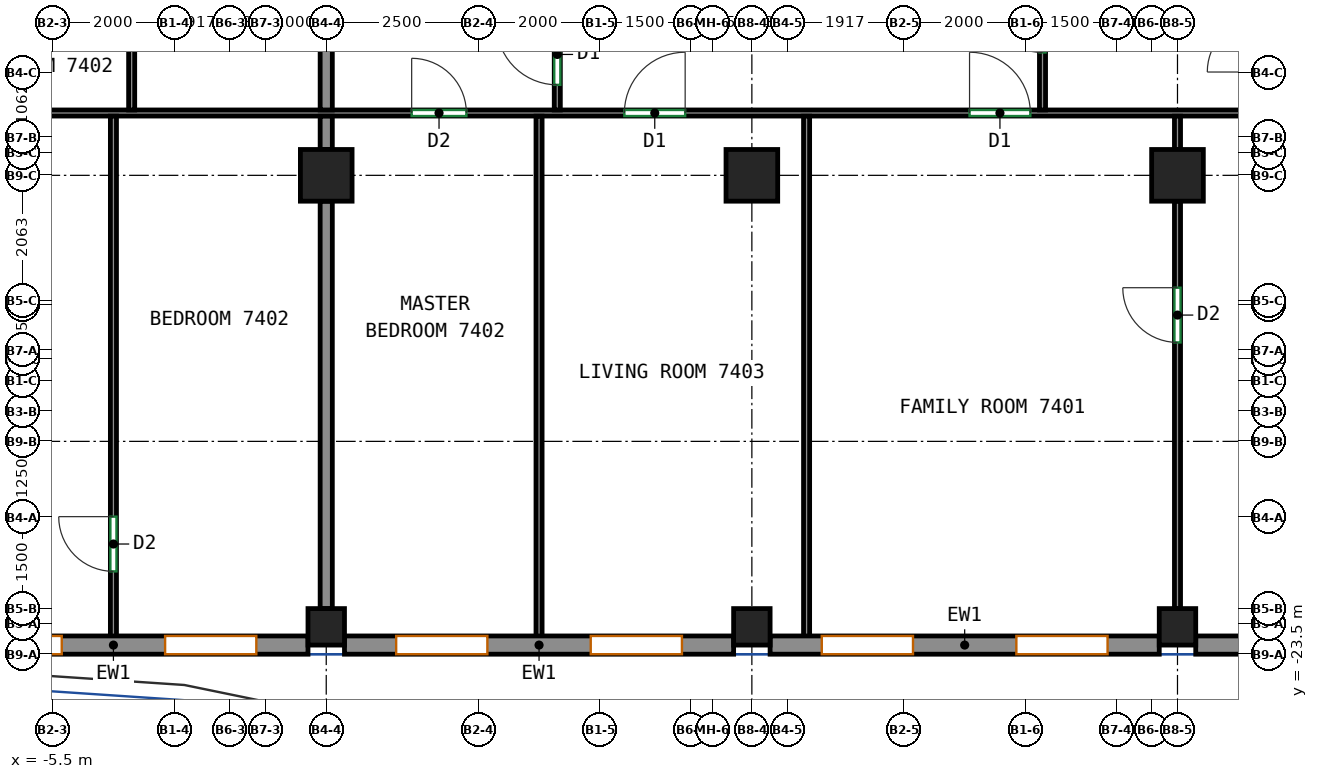
"""IFC4 building model, lengths in metres.
Left out: names, types, materials, properties, quantities, classifications, styles, units other than length and angle.
Written with IfcOpenShell. Run it as: python <this file> out.ifc"""

import sys

from ifc_helpers import new_model, si_unit, direction, frame, frame_2d, origin, origin_2d, place, context, subcontext, project, spatial, rectangle, extrude, source, transform, mapped, element, fill, save


model = new_model("IFC4")
c1 = context("Model", 3, precision=1e-05, world=origin(), true_north=direction((0.0, 1.0)))
c2 = subcontext(c1, "Body", "Model", "MODEL_VIEW")
j1 = project(units=[si_unit("LENGTHUNIT", "METRE"), si_unit("PLANEANGLEUNIT", "RADIAN")], contexts=[c1])
p1 = place(None, origin())
s1 = spatial("IfcSite", under=j1, at=p1, CompositionType="ELEMENT")
p2 = place(p1, origin())
s2 = spatial("IfcBuilding", under=s1, at=p2, CompositionType="ELEMENT")
p3 = place(p2, frame((0.0, 0.0, 298.4)))
s3 = spatial("IfcBuildingStorey", under=s2, at=p3, CompositionType="ELEMENT", Elevation=298.4)
m1 = source(origin(), c2, "Body", "SweptSolid", [
    extrude(rectangle(XDim=0.6, YDim=0.6, at=origin_2d()), origin(), (0.0, 0.0, 1.0), 3.12),
])
p4 = place(p3, frame((-1.0, -23.05, 0.0), z_axis=(0.0, 0.0, 1.0), x_axis=(1.0, 0.0, 0.0)))
e1 = element("IfcColumn", 1, at=p4, inside=s3, PredefinedType="COLUMN", context=c2, shape_type="MappedRepresentation", body=[
    mapped(m1, transform((0.0, 0.0, 0.0))),
])
m2 = source(origin(), c2, "Body", "SweptSolid", [
    extrude(rectangle(XDim=0.85, YDim=0.85, at=origin_2d()), origin(), (0.0, 0.0, 1.0), 3.12),
])
p5 = place(p3, frame((-1.0, -15.625, 0.0), z_axis=(0.0, 0.0, 1.0), x_axis=(1.0, 0.0, 0.0)))
e2 = element("IfcColumn", 2, at=p5, inside=s3, PredefinedType="COLUMN", context=c2, shape_type="MappedRepresentation", body=[
    mapped(m2, transform((0.0, 0.0, 0.0))),
])
p6 = place(p3, frame((6.0, -23.05, 0.0), z_axis=(0.0, 0.0, 1.0), x_axis=(1.0, 0.0, 0.0)))
e3 = element("IfcColumn", 3, at=p6, inside=s3, PredefinedType="COLUMN", context=c2, shape_type="MappedRepresentation", body=[
    mapped(m1, transform((0.0, 0.0, 0.0))),
])
p7 = place(p3, frame((6.0, -15.625, 0.0), z_axis=(0.0, 0.0, 1.0), x_axis=(1.0, 0.0, 0.0)))
e4 = element("IfcColumn", 4, at=p7, inside=s3, PredefinedType="COLUMN", context=c2, shape_type="MappedRepresentation", body=[
    mapped(m2, transform((0.0, 0.0, 0.0))),
])
p8 = place(p3, frame((13.0, -23.05, 0.0), z_axis=(0.0, 0.0, 1.0), x_axis=(1.0, 0.0, 0.0)))
e5 = element("IfcColumn", 5, at=p8, inside=s3, PredefinedType="COLUMN", context=c2, shape_type="MappedRepresentation", body=[
    mapped(m1, transform((0.0, 0.0, 0.0))),
])
p9 = place(p3, frame((13.0, -15.625, 0.0), z_axis=(0.0, 0.0, 1.0), x_axis=(1.0, 0.0, 0.0)))
e6 = element("IfcColumn", 6, at=p9, inside=s3, PredefinedType="COLUMN", context=c2, shape_type="MappedRepresentation", body=[
    mapped(m2, transform((0.0, 0.0, 0.0))),
])
m3 = source(origin(), c2, "Body", "SweptSolid", [
    extrude(rectangle(XDim=6.4, YDim=0.3, at=frame_2d((3.2, 0.0))), origin(), (0.0, 0.0, 1.0), 3.12),
])
p10 = place(p3, frame((-7.7, -23.35, 0.0), z_axis=(0.0, 0.0, 1.0), x_axis=(1.0, 0.0, 0.0)))
e7 = element("IfcWall", 7, at=p10, inside=s3, PredefinedType="SOLIDWALL", context=c2, shape_type="MappedRepresentation", body=[
    mapped(m3, transform((0.0, 0.0, 0.0))),
])
p11 = place(p10, frame((0.85, 0.0, 0.8)))
e8 = element("IfcOpeningElement", 8, at=p11, cuts=e7, PredefinedType="OPENING", context=c2, shape_type="SweptSolid", body=[
    extrude(rectangle(XDim=1.5, YDim=2.05, at=frame_2d((0.75, 1.025))), frame((0.0, 0.16, 0.0), z_axis=(0.0, -1.0, 0.0), x_axis=(1.0, 0.0, 0.0)), (0.0, 0.0, 1.0), 0.32),
])
p12 = place(p10, frame((4.05, 0.0, 0.8)))
e9 = element("IfcOpeningElement", 9, at=p12, cuts=e7, PredefinedType="OPENING", context=c2, shape_type="SweptSolid", body=[
    extrude(rectangle(XDim=1.5, YDim=2.05, at=frame_2d((0.75, 1.025))), frame((0.0, 0.16, 0.0), z_axis=(0.0, -1.0, 0.0), x_axis=(1.0, 0.0, 0.0)), (0.0, 0.0, 1.0), 0.32),
])
p13 = place(p3, frame((-0.7, -23.35, 0.0), z_axis=(0.0, 0.0, 1.0), x_axis=(1.0, 0.0, 0.0)))
e10 = element("IfcWall", 10, at=p13, inside=s3, PredefinedType="SOLIDWALL", context=c2, shape_type="MappedRepresentation", body=[
    mapped(m3, transform((0.0, 0.0, 0.0))),
])
p14 = place(p13, frame((0.85, 0.0, 0.8)))
e11 = element("IfcOpeningElement", 11, at=p14, cuts=e10, PredefinedType="OPENING", context=c2, shape_type="SweptSolid", body=[
    extrude(rectangle(XDim=1.5, YDim=2.05, at=frame_2d((0.75, 1.025))), frame((0.0, 0.16, 0.0), z_axis=(0.0, -1.0, 0.0), x_axis=(1.0, 0.0, 0.0)), (0.0, 0.0, 1.0), 0.32),
])
p15 = place(p13, frame((4.05, 0.0, 0.8)))
e12 = element("IfcOpeningElement", 12, at=p15, cuts=e10, PredefinedType="OPENING", context=c2, shape_type="SweptSolid", body=[
    extrude(rectangle(XDim=1.5, YDim=2.05, at=frame_2d((0.75, 1.025))), frame((0.0, 0.16, 0.0), z_axis=(0.0, -1.0, 0.0), x_axis=(1.0, 0.0, 0.0)), (0.0, 0.0, 1.0), 0.32),
])
p16 = place(p3, frame((6.3, -23.35, 0.0), z_axis=(0.0, 0.0, 1.0), x_axis=(1.0, 0.0, 0.0)))
e13 = element("IfcWall", 13, at=p16, inside=s3, PredefinedType="SOLIDWALL", context=c2, shape_type="MappedRepresentation", body=[
    mapped(m3, transform((0.0, 0.0, 0.0))),
])
p17 = place(p16, frame((0.85, 0.0, 0.8)))
e14 = element("IfcOpeningElement", 14, at=p17, cuts=e13, PredefinedType="OPENING", context=c2, shape_type="SweptSolid", body=[
    extrude(rectangle(XDim=1.5, YDim=2.05, at=frame_2d((0.75, 1.025))), frame((0.0, 0.16, 0.0), z_axis=(0.0, -1.0, 0.0), x_axis=(1.0, 0.0, 0.0)), (0.0, 0.0, 1.0), 0.32),
])
p18 = place(p16, frame((4.05, 0.0, 0.8)))
e15 = element("IfcOpeningElement", 15, at=p18, cuts=e13, PredefinedType="OPENING", context=c2, shape_type="SweptSolid", body=[
    extrude(rectangle(XDim=1.5, YDim=2.05, at=frame_2d((0.75, 1.025))), frame((0.0, 0.16, 0.0), z_axis=(0.0, -1.0, 0.0), x_axis=(1.0, 0.0, 0.0)), (0.0, 0.0, 1.0), 0.32),
])
p19 = place(p3, frame((13.3, -23.35, 0.0), z_axis=(0.0, 0.0, 1.0), x_axis=(1.0, 0.0, 0.0)))
e16 = element("IfcWall", 16, at=p19, inside=s3, PredefinedType="SOLIDWALL", context=c2, shape_type="MappedRepresentation", body=[
    mapped(m3, transform((0.0, 0.0, 0.0))),
])
p20 = place(p19, frame((0.85, 0.0, 0.8)))
e17 = element("IfcOpeningElement", 17, at=p20, cuts=e16, PredefinedType="OPENING", context=c2, shape_type="SweptSolid", body=[
    extrude(rectangle(XDim=1.5, YDim=2.05, at=frame_2d((0.75, 1.025))), frame((0.0, 0.16, 0.0), z_axis=(0.0, -1.0, 0.0), x_axis=(1.0, 0.0, 0.0)), (0.0, 0.0, 1.0), 0.32),
])
p21 = place(p19, frame((4.05, 0.0, 0.8)))
e18 = element("IfcOpeningElement", 18, at=p21, cuts=e16, PredefinedType="OPENING", context=c2, shape_type="SweptSolid", body=[
    extrude(rectangle(XDim=1.5, YDim=2.05, at=frame_2d((0.75, 1.025))), frame((0.0, 0.16, 0.0), z_axis=(0.0, -1.0, 0.0), x_axis=(1.0, 0.0, 0.0)), (0.0, 0.0, 1.0), 0.32),
])
p22 = place(p3, frame((-13.55, -14.6, 0.0), z_axis=(0.0, 0.0, 1.0), x_axis=(1.0, 0.0, 0.0)))
e19 = element("IfcWall", 19, at=p22, inside=s3, PredefinedType="PARTITIONING", context=c2, shape_type="SweptSolid", body=[
    extrude(rectangle(XDim=31.3, YDim=0.1, at=frame_2d((15.65, 0.0))), origin(), (0.0, 0.0, 1.0), 3.12),
])
p23 = place(p22, frame((0.309, 0.0, 0.0)))
e20 = element("IfcOpeningElement", 20, at=p23, cuts=e19, PredefinedType="OPENING", context=c2, shape_type="SweptSolid", body=[
    extrude(rectangle(XDim=0.9, YDim=2.1, at=frame_2d((0.45, 1.05))), frame((0.0, 0.06, 0.0), z_axis=(0.0, -1.0, 0.0), x_axis=(1.0, 0.0, 0.0)), (0.0, 0.0, 1.0), 0.12),
])
p24 = place(p22, frame((4.103, 0.0, 0.0)))
e21 = element("IfcOpeningElement", 21, at=p24, cuts=e19, PredefinedType="OPENING", context=c2, shape_type="SweptSolid", body=[
    extrude(rectangle(XDim=1.0, YDim=2.1, at=frame_2d((0.5, 1.05))), frame((0.0, 0.06, 0.0), z_axis=(0.0, -1.0, 0.0), x_axis=(1.0, 0.0, 0.0)), (0.0, 0.0, 1.0), 0.12),
])
p25 = place(p22, frame((13.955, 0.0, 0.0)))
e22 = element("IfcOpeningElement", 22, at=p25, cuts=e19, PredefinedType="OPENING", context=c2, shape_type="SweptSolid", body=[
    extrude(rectangle(XDim=0.9, YDim=2.1, at=frame_2d((0.45, 1.05))), frame((0.0, 0.06, 0.0), z_axis=(0.0, -1.0, 0.0), x_axis=(1.0, 0.0, 0.0)), (0.0, 0.0, 1.0), 0.12),
])
p26 = place(p22, frame((17.453, 0.0, 0.0)))
e23 = element("IfcOpeningElement", 23, at=p26, cuts=e19, PredefinedType="OPENING", context=c2, shape_type="SweptSolid", body=[
    extrude(rectangle(XDim=1.0, YDim=2.1, at=frame_2d((0.5, 1.05))), frame((0.0, 0.06, 0.0), z_axis=(0.0, -1.0, 0.0), x_axis=(1.0, 0.0, 0.0)), (0.0, 0.0, 1.0), 0.12),
])
p27 = place(p22, frame((23.13, 0.0, 0.0)))
e24 = element("IfcOpeningElement", 24, at=p27, cuts=e19, PredefinedType="OPENING", context=c2, shape_type="SweptSolid", body=[
    extrude(rectangle(XDim=1.0, YDim=2.1, at=frame_2d((0.5, 1.05))), frame((0.0, 0.06, 0.0), z_axis=(0.0, -1.0, 0.0), x_axis=(1.0, 0.0, 0.0)), (0.0, 0.0, 1.0), 0.12),
])
p28 = place(p3, frame((-4.2, -14.55, 0.0), z_axis=(0.0, 0.0, 1.0), x_axis=(0.0, 1.0, 0.0)))
e25 = element("IfcWall", 25, at=p28, inside=s3, PredefinedType="PARTITIONING", context=c2, shape_type="SweptSolid", body=[
    extrude(rectangle(XDim=2.573, YDim=0.1, at=frame_2d((1.287, 0.0))), origin(), (0.0, 0.0, 1.0), 3.12),
])
p29 = place(p28, frame((1.261, 0.0, 0.0)))
e26 = element("IfcOpeningElement", 26, at=p29, cuts=e25, PredefinedType="OPENING", context=c2, shape_type="SweptSolid", body=[
    extrude(rectangle(XDim=0.9, YDim=2.1, at=frame_2d((0.45, 1.05))), frame((0.0, 0.06, 0.0), z_axis=(0.0, -1.0, 0.0), x_axis=(1.0, 0.0, 0.0)), (0.0, 0.0, 1.0), 0.12),
])
p30 = place(p3, frame((-1.0, -14.55, 0.0), z_axis=(0.0, 0.0, 1.0), x_axis=(0.0, 1.0, 0.0)))
e27 = element("IfcWall", 27, at=p30, inside=s3, PredefinedType="PARTITIONING", context=c2, shape_type="SweptSolid", body=[
    extrude(rectangle(XDim=2.573, YDim=0.2, at=frame_2d((1.287, 0.0))), origin(), (0.0, 0.0, 1.0), 3.12),
])
p31 = place(p3, frame((-4.5, -23.25, 0.0), z_axis=(0.0, 0.0, 1.0), x_axis=(0.0, 1.0, 0.0)))
e28 = element("IfcWall", 28, at=p31, inside=s3, PredefinedType="PARTITIONING", context=c2, shape_type="SweptSolid", body=[
    extrude(rectangle(XDim=8.598, YDim=0.1, at=frame_2d((4.299, 0.0))), origin(), (0.0, 0.0, 1.0), 3.12),
])
p32 = place(p31, frame((1.112, 0.0, 0.0)))
e29 = element("IfcOpeningElement", 29, at=p32, cuts=e28, PredefinedType="OPENING", context=c2, shape_type="SweptSolid", body=[
    extrude(rectangle(XDim=0.9, YDim=2.1, at=frame_2d((0.45, 1.05))), frame((0.0, 0.06, 0.0), z_axis=(0.0, -1.0, 0.0), x_axis=(1.0, 0.0, 0.0)), (0.0, 0.0, 1.0), 0.12),
])
p33 = place(p3, frame((-1.0, -15.2, 0.0), z_axis=(0.0, 0.0, 1.0), x_axis=(0.0, 1.0, 0.0)))
e30 = element("IfcWall", 30, at=p33, inside=s3, PredefinedType="PARTITIONING", context=c2, shape_type="SweptSolid", body=[
    extrude(rectangle(XDim=0.548, YDim=0.2, at=frame_2d((0.274, 0.0))), origin(), (0.0, 0.0, 1.0), 3.12),
])
p34 = place(p3, frame((-1.0, -22.75, 0.0), z_axis=(0.0, 0.0, 1.0), x_axis=(0.0, 1.0, 0.0)))
e31 = element("IfcWall", 31, at=p34, inside=s3, PredefinedType="PARTITIONING", context=c2, shape_type="SweptSolid", body=[
    extrude(rectangle(XDim=6.7, YDim=0.2, at=frame_2d((3.35, 0.0))), origin(), (0.0, 0.0, 1.0), 3.12),
])
p35 = place(p3, frame((2.8, -14.55, 0.0), z_axis=(0.0, 0.0, 1.0), x_axis=(0.0, 1.0, 0.0)))
e32 = element("IfcWall", 32, at=p35, inside=s3, PredefinedType="PARTITIONING", context=c2, shape_type="SweptSolid", body=[
    extrude(rectangle(XDim=2.573, YDim=0.1, at=frame_2d((1.287, 0.0))), origin(), (0.0, 0.0, 1.0), 3.12),
])
p36 = place(p35, frame((0.413, 0.0, 0.0)))
e33 = element("IfcOpeningElement", 33, at=p36, cuts=e32, PredefinedType="OPENING", context=c2, shape_type="SweptSolid", body=[
    extrude(rectangle(XDim=1.0, YDim=2.1, at=frame_2d((0.5, 1.05))), frame((0.0, 0.06, 0.0), z_axis=(0.0, -1.0, 0.0), x_axis=(1.0, 0.0, 0.0)), (0.0, 0.0, 1.0), 0.12),
])
p37 = place(p3, frame((10.78, -14.55, 0.0), z_axis=(0.0, 0.0, 1.0), x_axis=(0.0, 1.0, 0.0)))
e34 = element("IfcWall", 34, at=p37, inside=s3, PredefinedType="PARTITIONING", context=c2, shape_type="SweptSolid", body=[
    extrude(rectangle(XDim=2.573, YDim=0.1, at=frame_2d((1.287, 0.0))), origin(), (0.0, 0.0, 1.0), 3.12),
])
p38 = place(p37, frame((0.946, 0.0, 0.0)))
e35 = element("IfcOpeningElement", 35, at=p38, cuts=e34, PredefinedType="OPENING", context=c2, shape_type="SweptSolid", body=[
    extrude(rectangle(XDim=1.0, YDim=2.1, at=frame_2d((0.5, 1.05))), frame((0.0, 0.06, 0.0), z_axis=(0.0, -1.0, 0.0), x_axis=(1.0, 0.0, 0.0)), (0.0, 0.0, 1.0), 0.12),
])
for number, where, z_axis, x_axis in (
    (36, (2.5, -23.25, 0.0), (0.0, 0.0, 1.0), (0.0, 1.0, 0.0)),
    (37, (6.9, -23.25, 0.0), (0.0, 0.0, 1.0), (0.0, 1.0, 0.0)),
):
    element("IfcWall", number, at=place(p3, frame(where, z_axis=z_axis, x_axis=x_axis)), inside=s3, PredefinedType="PARTITIONING", context=c2, shape_type="SweptSolid", body=[
        extrude(rectangle(XDim=8.598, YDim=0.1, at=frame_2d((4.299, 0.0))), origin(), (0.0, 0.0, 1.0), 3.12),
    ])
p39 = place(p3, frame((13.0, -15.2, 0.0), z_axis=(0.0, 0.0, 1.0), x_axis=(0.0, 1.0, 0.0)))
e38 = element("IfcWall", 38, at=p39, inside=s3, PredefinedType="PARTITIONING", context=c2, shape_type="SweptSolid", body=[
    extrude(rectangle(XDim=0.548, YDim=0.1, at=frame_2d((0.274, 0.0))), origin(), (0.0, 0.0, 1.0), 3.12),
])
p40 = place(p3, frame((13.0, -22.75, 0.0), z_axis=(0.0, 0.0, 1.0), x_axis=(0.0, 1.0, 0.0)))
e39 = element("IfcWall", 39, at=p40, inside=s3, PredefinedType="PARTITIONING", context=c2, shape_type="SweptSolid", body=[
    extrude(rectangle(XDim=6.7, YDim=0.1, at=frame_2d((3.35, 0.0))), origin(), (0.0, 0.0, 1.0), 3.12),
])
p41 = place(p40, frame((4.377, 0.0, 0.0)))
e40 = element("IfcOpeningElement", 40, at=p41, cuts=e39, PredefinedType="OPENING", context=c2, shape_type="SweptSolid", body=[
    extrude(rectangle(XDim=0.9, YDim=2.1, at=frame_2d((0.45, 1.05))), frame((0.0, 0.06, 0.0), z_axis=(0.0, -1.0, 0.0), x_axis=(1.0, 0.0, 0.0)), (0.0, 0.0, 1.0), 0.12),
])
p42 = place(p11, origin())
e41 = element("IfcWindow", 41, at=p42, inside=s3, PartitioningType="SINGLE_PANEL", PredefinedType="WINDOW", context=c2, shape_type="SweptSolid", body=[
    extrude(rectangle(XDim=1.5, YDim=2.05, at=frame_2d((0.75, 1.025))), frame((0.0, 0.03, 0.0), z_axis=(0.0, -1.0, 0.0), x_axis=(1.0, 0.0, 0.0)), (0.0, 0.0, 1.0), 0.06),
])
fill(e8, e41)
p43 = place(p12, origin())
e42 = element("IfcWindow", 42, at=p43, inside=s3, PartitioningType="SINGLE_PANEL", PredefinedType="WINDOW", context=c2, shape_type="SweptSolid", body=[
    extrude(rectangle(XDim=1.5, YDim=2.05, at=frame_2d((0.75, 1.025))), frame((0.0, 0.03, 0.0), z_axis=(0.0, -1.0, 0.0), x_axis=(1.0, 0.0, 0.0)), (0.0, 0.0, 1.0), 0.06),
])
fill(e9, e42)
p44 = place(p14, origin())
e43 = element("IfcWindow", 43, at=p44, inside=s3, PartitioningType="SINGLE_PANEL", PredefinedType="WINDOW", context=c2, shape_type="SweptSolid", body=[
    extrude(rectangle(XDim=1.5, YDim=2.05, at=frame_2d((0.75, 1.025))), frame((0.0, 0.03, 0.0), z_axis=(0.0, -1.0, 0.0), x_axis=(1.0, 0.0, 0.0)), (0.0, 0.0, 1.0), 0.06),
])
fill(e11, e43)
p45 = place(p15, origin())
e44 = element("IfcWindow", 44, at=p45, inside=s3, PartitioningType="SINGLE_PANEL", PredefinedType="WINDOW", context=c2, shape_type="SweptSolid", body=[
    extrude(rectangle(XDim=1.5, YDim=2.05, at=frame_2d((0.75, 1.025))), frame((0.0, 0.03, 0.0), z_axis=(0.0, -1.0, 0.0), x_axis=(1.0, 0.0, 0.0)), (0.0, 0.0, 1.0), 0.06),
])
fill(e12, e44)
p46 = place(p17, origin())
e45 = element("IfcWindow", 45, at=p46, inside=s3, PartitioningType="SINGLE_PANEL", PredefinedType="WINDOW", context=c2, shape_type="SweptSolid", body=[
    extrude(rectangle(XDim=1.5, YDim=2.05, at=frame_2d((0.75, 1.025))), frame((0.0, 0.03, 0.0), z_axis=(0.0, -1.0, 0.0), x_axis=(1.0, 0.0, 0.0)), (0.0, 0.0, 1.0), 0.06),
])
fill(e14, e45)
p47 = place(p18, origin())
e46 = element("IfcWindow", 46, at=p47, inside=s3, PartitioningType="SINGLE_PANEL", PredefinedType="WINDOW", context=c2, shape_type="SweptSolid", body=[
    extrude(rectangle(XDim=1.5, YDim=2.05, at=frame_2d((0.75, 1.025))), frame((0.0, 0.03, 0.0), z_axis=(0.0, -1.0, 0.0), x_axis=(1.0, 0.0, 0.0)), (0.0, 0.0, 1.0), 0.06),
])
fill(e15, e46)
p48 = place(p32, origin())
e47 = element("IfcDoor", 47, at=p48, inside=s3, OperationType="SINGLE_SWING_RIGHT", PredefinedType="DOOR", context=c2, shape_type="SweptSolid", body=[
    extrude(rectangle(XDim=0.9, YDim=2.1, at=frame_2d((0.45, 1.05))), frame((0.0, 0.025, 0.0), z_axis=(0.0, -1.0, 0.0), x_axis=(1.0, 0.0, 0.0)), (0.0, 0.0, 1.0), 0.05),
])
fill(e29, e47)
p49 = place(p41, origin())
e48 = element("IfcDoor", 48, at=p49, inside=s3, OperationType="SINGLE_SWING_RIGHT", PredefinedType="DOOR", context=c2, shape_type="SweptSolid", body=[
    extrude(rectangle(XDim=0.9, YDim=2.1, at=frame_2d((0.45, 1.05))), frame((0.0, 0.025, 0.0), z_axis=(0.0, -1.0, 0.0), x_axis=(1.0, 0.0, 0.0)), (0.0, 0.0, 1.0), 0.05),
])
fill(e40, e48)
p50 = place(p25, origin())
e49 = element("IfcDoor", 49, at=p50, inside=s3, OperationType="SINGLE_SWING_LEFT", PredefinedType="DOOR", context=c2, shape_type="SweptSolid", body=[
    extrude(rectangle(XDim=0.9, YDim=2.1, at=frame_2d((0.45, 1.05))), frame((0.0, 0.025, 0.0), z_axis=(0.0, -1.0, 0.0), x_axis=(1.0, 0.0, 0.0)), (0.0, 0.0, 1.0), 0.05),
])
fill(e22, e49)
p51 = place(p26, origin())
e50 = element("IfcDoor", 50, at=p51, inside=s3, OperationType="SINGLE_SWING_RIGHT", PredefinedType="DOOR", context=c2, shape_type="SweptSolid", body=[
    extrude(rectangle(XDim=1.0, YDim=2.1, at=frame_2d((0.5, 1.05))), frame((0.0, 0.025, 0.0), z_axis=(0.0, -1.0, 0.0), x_axis=(1.0, 0.0, 0.0)), (0.0, 0.0, 1.0), 0.05),
])
fill(e23, e50)
p52 = place(p27, origin())
e51 = element("IfcDoor", 51, at=p52, inside=s3, OperationType="SINGLE_SWING_LEFT", PredefinedType="DOOR", context=c2, shape_type="SweptSolid", body=[
    extrude(rectangle(XDim=1.0, YDim=2.1, at=frame_2d((0.5, 1.05))), frame((0.0, 0.025, 0.0), z_axis=(0.0, -1.0, 0.0), x_axis=(1.0, 0.0, 0.0)), (0.0, 0.0, 1.0), 0.05),
])
fill(e24, e51)
p53 = place(p36, origin())
e52 = element("IfcDoor", 52, at=p53, inside=s3, OperationType="SINGLE_SWING_RIGHT", PredefinedType="DOOR", context=c2, shape_type="SweptSolid", body=[
    extrude(rectangle(XDim=1.0, YDim=2.1, at=frame_2d((0.5, 1.05))), frame((0.0, 0.025, 0.0), z_axis=(0.0, -1.0, 0.0), x_axis=(1.0, 0.0, 0.0)), (0.0, 0.0, 1.0), 0.05),
])
fill(e33, e52)
p54 = place(p38, origin())
e53 = element("IfcDoor", 53, at=p54, inside=s3, OperationType="SINGLE_SWING_RIGHT", PredefinedType="DOOR", context=c2, shape_type="SweptSolid", body=[
    extrude(rectangle(XDim=1.0, YDim=2.1, at=frame_2d((0.5, 1.05))), frame((0.0, 0.025, 0.0), z_axis=(0.0, -1.0, 0.0), x_axis=(1.0, 0.0, 0.0)), (0.0, 0.0, 1.0), 0.05),
])
fill(e35, e53)
save(model, sys.argv[1])
